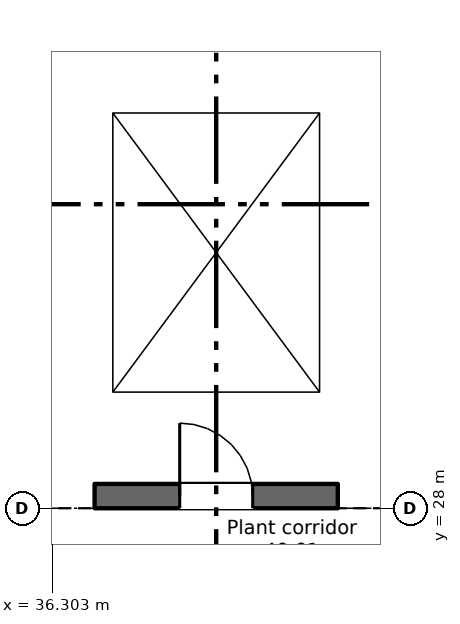
"""IFC4 building model, lengths in metres.
Left out: names, types, materials, properties, quantities, classifications, styles, units other than length and angle.
Written with IfcOpenShell. Run it as: python <this file> out.ifc"""

import sys

from ifc_helpers import new_model, si_unit, direction, frame, frame_2d, origin, place, context, subcontext, project, spatial, rectangle, extrude, element, fill, save


model = new_model("IFC4")
c1 = context("Model", 3, precision=1e-05, world=origin(), true_north=direction((0.0, 1.0)))
c2 = subcontext(c1, "Body", "Model", "MODEL_VIEW")
j1 = project(units=[si_unit("LENGTHUNIT", "METRE"), si_unit("PLANEANGLEUNIT", "RADIAN")], contexts=[c1])
p1 = place(None, origin())
s1 = spatial("IfcSite", under=j1, at=p1, CompositionType="ELEMENT")
p2 = place(p1, origin())
s2 = spatial("IfcBuilding", under=s1, at=p2, CompositionType="ELEMENT")
p3 = place(p2, frame((0.0, 0.0, 271.95)))
s3 = spatial("IfcBuildingStorey", under=s2, at=p3, CompositionType="ELEMENT", Elevation=271.95)
for number, where, z_axis, x_axis in (
    (1, (37.15, 28.4, 0.0), (0.0, 0.0, 1.0), (0.0, 1.0, 0.0)),
    (2, (40.85, 28.4, 0.0), (0.0, 0.0, 1.0), (0.0, 1.0, 0.0)),
):
    element("IfcWall", number, at=place(p3, frame(where, z_axis=z_axis, x_axis=x_axis)), inside=s3, PredefinedType="SHEAR", context=c2, shape_type="SweptSolid", body=[
        extrude(rectangle(XDim=6.1, YDim=0.3, at=frame_2d((3.05, 0.0))), origin(), (0.0, 0.0, 1.0), 6.0),
    ])
p4 = place(p3, frame((37.0, 28.2, 0.0), z_axis=(0.0, 0.0, 1.0), x_axis=(1.0, 0.0, 0.0)))
e3 = element("IfcWall", 3, at=p4, inside=s3, PredefinedType="SHEAR", context=c2, shape_type="SweptSolid", body=[
    extrude(rectangle(XDim=4.0, YDim=0.4, at=frame_2d((2.0, 0.0))), origin(), (0.0, 0.0, 1.0), 6.0),
])
p5 = place(p4, frame((1.4, 0.0, 0.0)))
e4 = element("IfcOpeningElement", 4, at=p5, cuts=e3, PredefinedType="OPENING", context=c2, shape_type="SweptSolid", body=[
    extrude(rectangle(XDim=1.2, YDim=2.1, at=frame_2d((0.6, 1.05))), frame((0.0, 0.21, 0.0), z_axis=(0.0, -1.0, 0.0), x_axis=(1.0, 0.0, 0.0)), (0.0, 0.0, 1.0), 0.42),
])
p6 = place(p3, frame((37.0, 34.65, 0.0), z_axis=(0.0, 0.0, 1.0), x_axis=(1.0, 0.0, 0.0)))
e5 = element("IfcWall", 5, at=p6, inside=s3, PredefinedType="SHEAR", context=c2, shape_type="SweptSolid", body=[
    extrude(rectangle(XDim=4.0, YDim=0.3, at=frame_2d((2.0, 0.0))), origin(), (0.0, 0.0, 1.0), 6.0),
])
p7 = place(p5, origin())
e6 = element("IfcDoor", 6, at=p7, inside=s3, OperationType="SINGLE_SWING_LEFT", PredefinedType="DOOR", context=c2, shape_type="SweptSolid", body=[
    extrude(rectangle(XDim=1.2, YDim=2.1, at=frame_2d((0.6, 1.05))), frame((0.0, 0.025, 0.0), z_axis=(0.0, -1.0, 0.0), x_axis=(1.0, 0.0, 0.0)), (0.0, 0.0, 1.0), 0.05),
])
fill(e4, e6)
save(model, sys.argv[1])
